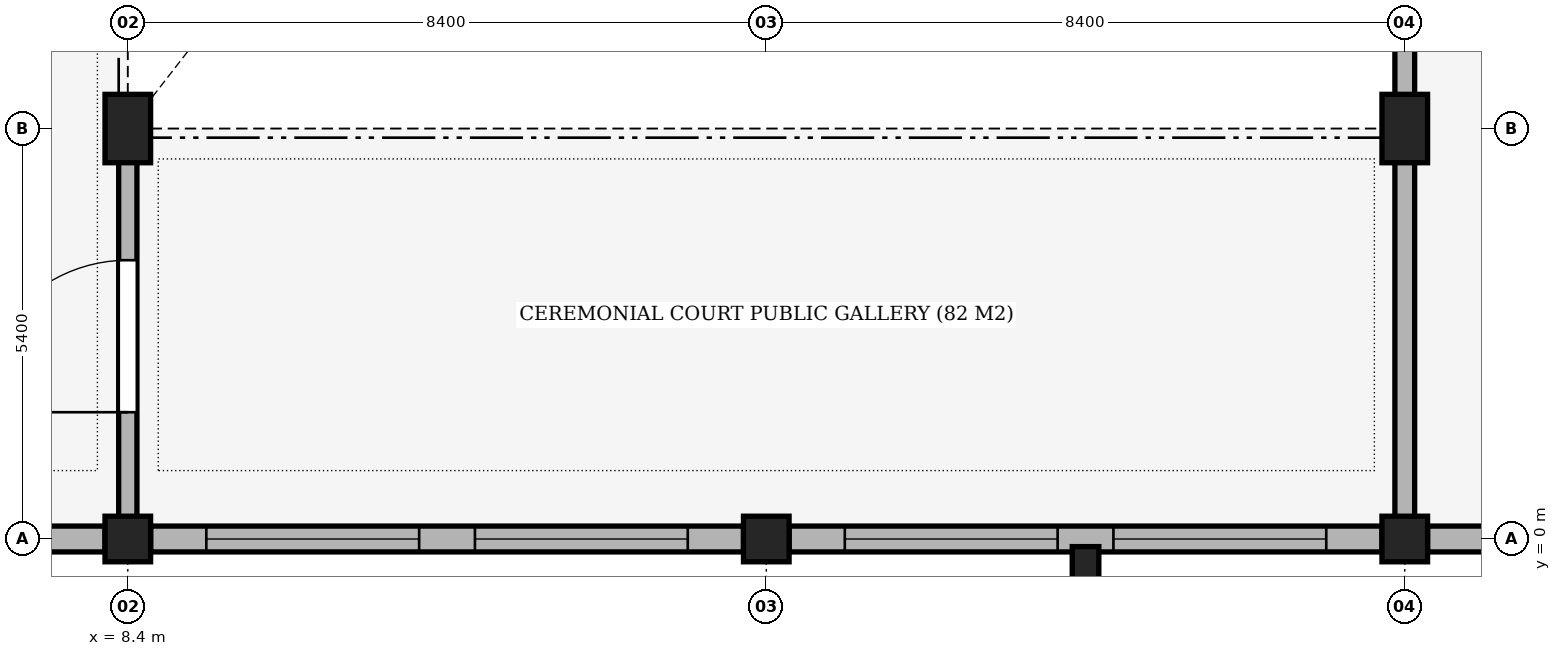
"""IFC4 building model, lengths in metres.
Left out: names, types, materials, properties, quantities, classifications, styles, units other than length and angle.
Written with IfcOpenShell. Run it as: python <this file> out.ifc"""

import sys

from ifc_helpers import new_model, si_unit, direction, frame, frame_2d, origin, origin_2d, place, context, subcontext, project, spatial, rectangle, extrude, element, fill, save


model = new_model("IFC4")
c1 = context("Model", 3, precision=1e-05, world=origin(), true_north=direction((0.0, 1.0)))
c2 = subcontext(c1, "Body", "Model", "MODEL_VIEW")
j1 = project(units=[si_unit("LENGTHUNIT", "METRE"), si_unit("PLANEANGLEUNIT", "RADIAN")], contexts=[c1])
p1 = place(None, origin())
s1 = spatial("IfcSite", under=j1, at=p1, CompositionType="ELEMENT")
p2 = place(p1, origin())
s2 = spatial("IfcBuilding", under=s1, at=p2, CompositionType="ELEMENT")
p3 = place(p2, frame((0.0, 0.0, 15.3)))
s3 = spatial("IfcBuildingStorey", under=s2, at=p3, CompositionType="ELEMENT", Elevation=15.3)
p4 = place(p3, frame((8.4, 0.0, 0.0), z_axis=(0.0, 0.0, 1.0), x_axis=(1.0, 0.0, 0.0)))
e1 = element("IfcColumn", 1, at=p4, inside=s3, PredefinedType="COLUMN", context=c2, shape_type="SweptSolid", body=[
    extrude(rectangle(XDim=0.6, YDim=0.6, at=origin_2d()), origin(), (0.0, 0.0, 1.0), 5.1),
])
p5 = place(p3, frame((8.4, 5.4, 0.0), z_axis=(0.0, 0.0, 1.0), x_axis=(1.0, 0.0, 0.0)))
e2 = element("IfcColumn", 2, at=p5, inside=s3, PredefinedType="COLUMN", context=c2, shape_type="SweptSolid", body=[
    extrude(rectangle(XDim=0.6, YDim=0.9, at=origin_2d()), origin(), (0.0, 0.0, 1.0), 5.1),
])
for number, where, z_axis, x_axis in (
    (3, (16.8, 0.0, 0.0), (0.0, 0.0, 1.0), (1.0, 0.0, 0.0)),
    (4, (25.2, 0.0, 0.0), (0.0, 0.0, 1.0), (1.0, 0.0, 0.0)),
):
    element("IfcColumn", number, at=place(p3, frame(where, z_axis=z_axis, x_axis=x_axis)), inside=s3, PredefinedType="COLUMN", context=c2, shape_type="SweptSolid", body=[
        extrude(rectangle(XDim=0.6, YDim=0.6, at=origin_2d()), origin(), (0.0, 0.0, 1.0), 5.1),
    ])
p6 = place(p3, frame((25.2, 5.4, 0.0), z_axis=(0.0, 0.0, 1.0), x_axis=(1.0, 0.0, 0.0)))
e5 = element("IfcColumn", 5, at=p6, inside=s3, PredefinedType="COLUMN", context=c2, shape_type="SweptSolid", body=[
    extrude(rectangle(XDim=0.6, YDim=0.9, at=origin_2d()), origin(), (0.0, 0.0, 1.0), 5.1),
])
p7 = place(p3, frame((21.0, -0.35, 0.0), z_axis=(0.0, 0.0, 1.0), x_axis=(1.0, 0.0, 0.0)))
e6 = element("IfcColumn", 6, at=p7, inside=s3, PredefinedType="PILASTER", context=c2, shape_type="SweptSolid", body=[
    extrude(rectangle(XDim=0.35, YDim=0.5, at=origin_2d()), origin(), (0.0, 0.0, 1.0), 5.1),
])
p8 = place(p3, frame((33.3, 0.0, 0.0), z_axis=(0.0, 0.0, 1.0), x_axis=(-1.0, 0.0, 0.0)))
e7 = element("IfcWall", 7, at=p8, inside=s3, PredefinedType="SOLIDWALL", context=c2, shape_type="SweptSolid", body=[
    extrude(rectangle(XDim=7.8, YDim=0.34, at=frame_2d((3.9, 0.0))), origin(), (0.0, 0.0, 1.0), 4.14),
])
p9 = place(p8, frame((4.267, 0.0, 0.75)))
e8 = element("IfcOpeningElement", 8, at=p9, cuts=e7, PredefinedType="OPENING", context=c2, shape_type="SweptSolid", body=[
    extrude(rectangle(XDim=2.8, YDim=2.6, at=frame_2d((1.4, 1.3))), frame((0.0, 0.185, 0.0), z_axis=(0.0, -1.0, 0.0), x_axis=(1.0, 0.0, 0.0)), (0.0, 0.0, 1.0), 0.37),
])
p10 = place(p3, frame((24.9, 0.0, 0.0), z_axis=(0.0, 0.0, 1.0), x_axis=(-1.0, 0.0, 0.0)))
e9 = element("IfcWall", 9, at=p10, inside=s3, PredefinedType="SOLIDWALL", context=c2, shape_type="SweptSolid", body=[
    extrude(rectangle(XDim=7.8, YDim=0.34, at=frame_2d((3.9, 0.0))), origin(), (0.0, 0.0, 1.0), 4.14),
])
p11 = place(p10, frame((0.733, 0.0, 0.75)))
e10 = element("IfcOpeningElement", 10, at=p11, cuts=e9, PredefinedType="OPENING", context=c2, shape_type="SweptSolid", body=[
    extrude(rectangle(XDim=2.8, YDim=2.6, at=frame_2d((1.4, 1.3))), frame((0.0, 0.185, 0.0), z_axis=(0.0, -1.0, 0.0), x_axis=(1.0, 0.0, 0.0)), (0.0, 0.0, 1.0), 0.37),
])
p12 = place(p10, frame((4.267, 0.0, 0.75)))
e11 = element("IfcOpeningElement", 11, at=p12, cuts=e9, PredefinedType="OPENING", context=c2, shape_type="SweptSolid", body=[
    extrude(rectangle(XDim=2.8, YDim=2.6, at=frame_2d((1.4, 1.3))), frame((0.0, 0.185, 0.0), z_axis=(0.0, -1.0, 0.0), x_axis=(1.0, 0.0, 0.0)), (0.0, 0.0, 1.0), 0.37),
])
p13 = place(p3, frame((16.5, 0.0, 0.0), z_axis=(0.0, 0.0, 1.0), x_axis=(-1.0, 0.0, 0.0)))
e12 = element("IfcWall", 12, at=p13, inside=s3, PredefinedType="SOLIDWALL", context=c2, shape_type="SweptSolid", body=[
    extrude(rectangle(XDim=7.8, YDim=0.34, at=frame_2d((3.9, 0.0))), origin(), (0.0, 0.0, 1.0), 4.14),
])
p14 = place(p13, frame((0.733, 0.0, 0.75)))
e13 = element("IfcOpeningElement", 13, at=p14, cuts=e12, PredefinedType="OPENING", context=c2, shape_type="SweptSolid", body=[
    extrude(rectangle(XDim=2.8, YDim=2.6, at=frame_2d((1.4, 1.3))), frame((0.0, 0.185, 0.0), z_axis=(0.0, -1.0, 0.0), x_axis=(1.0, 0.0, 0.0)), (0.0, 0.0, 1.0), 0.37),
])
p15 = place(p13, frame((4.267, 0.0, 0.75)))
e14 = element("IfcOpeningElement", 14, at=p15, cuts=e12, PredefinedType="OPENING", context=c2, shape_type="SweptSolid", body=[
    extrude(rectangle(XDim=2.8, YDim=2.6, at=frame_2d((1.4, 1.3))), frame((0.0, 0.185, 0.0), z_axis=(0.0, -1.0, 0.0), x_axis=(1.0, 0.0, 0.0)), (0.0, 0.0, 1.0), 0.37),
])
p16 = place(p3, frame((8.1, 0.0, 0.0), z_axis=(0.0, 0.0, 1.0), x_axis=(-1.0, 0.0, 0.0)))
e15 = element("IfcWall", 15, at=p16, inside=s3, PredefinedType="SOLIDWALL", context=c2, shape_type="SweptSolid", body=[
    extrude(rectangle(XDim=7.8, YDim=0.34, at=frame_2d((3.9, 0.0))), origin(), (0.0, 0.0, 1.0), 4.14),
])
p17 = place(p16, frame((0.733, 0.0, 0.75)))
e16 = element("IfcOpeningElement", 16, at=p17, cuts=e15, PredefinedType="OPENING", context=c2, shape_type="SweptSolid", body=[
    extrude(rectangle(XDim=2.8, YDim=2.6, at=frame_2d((1.4, 1.3))), frame((0.0, 0.185, 0.0), z_axis=(0.0, -1.0, 0.0), x_axis=(1.0, 0.0, 0.0)), (0.0, 0.0, 1.0), 0.37),
])
p18 = place(p16, frame((4.267, 0.0, 0.75)))
e17 = element("IfcOpeningElement", 17, at=p18, cuts=e15, PredefinedType="OPENING", context=c2, shape_type="SweptSolid", body=[
    extrude(rectangle(XDim=2.8, YDim=2.6, at=frame_2d((1.4, 1.3))), frame((0.0, 0.185, 0.0), z_axis=(0.0, -1.0, 0.0), x_axis=(1.0, 0.0, 0.0)), (0.0, 0.0, 1.0), 0.37),
])
p19 = place(p3, frame((8.4, -0.064, 0.0), z_axis=(0.0, 0.0, 1.0), x_axis=(0.0, 1.0, 0.0)))
e18 = element("IfcWall", 18, at=p19, inside=s3, PredefinedType="PARTITIONING", context=c2, shape_type="SweptSolid", body=[
    extrude(rectangle(XDim=5.464, YDim=0.24, at=frame_2d((2.732, 0.0))), origin(), (0.0, 0.0, 1.0), 3.69),
])
p20 = place(p19, frame((1.732, 0.0, 0.0)))
e19 = element("IfcOpeningElement", 19, at=p20, cuts=e18, PredefinedType="OPENING", context=c2, shape_type="SweptSolid", body=[
    extrude(rectangle(XDim=2.0, YDim=2.5, at=frame_2d((1.0, 1.25))), frame((0.0, 0.135, 0.0), z_axis=(0.0, -1.0, 0.0), x_axis=(1.0, 0.0, 0.0)), (0.0, 0.0, 1.0), 0.27),
])
p21 = place(p3, frame((25.2, -0.064, 0.0), z_axis=(0.0, 0.0, 1.0), x_axis=(0.0, 1.0, 0.0)))
e20 = element("IfcWall", 20, at=p21, inside=s3, PredefinedType="PARTITIONING", context=c2, shape_type="SweptSolid", body=[
    extrude(rectangle(XDim=5.464, YDim=0.26, at=frame_2d((2.732, 0.0))), origin(), (0.0, 0.0, 1.0), 3.69),
])
p22 = place(p3, frame((25.2, 5.4, 0.0), z_axis=(0.0, 0.0, 1.0), x_axis=(0.0, 1.0, 0.0)))
e21 = element("IfcWall", 21, at=p22, inside=s3, PredefinedType="PARTITIONING", context=c2, shape_type="SweptSolid", body=[
    extrude(rectangle(XDim=21.478, YDim=0.26, at=frame_2d((10.739, 0.0))), origin(), (0.0, 0.0, 1.0), 3.59),
])
p23 = place(p11, origin())
e22 = element("IfcWindow", 22, at=p23, inside=s3, PartitioningType="SINGLE_PANEL", PredefinedType="WINDOW", context=c2, shape_type="SweptSolid", body=[
    extrude(rectangle(XDim=2.8, YDim=2.6, at=frame_2d((1.4, 1.3))), frame((0.0, 0.03, 0.0), z_axis=(0.0, -1.0, 0.0), x_axis=(1.0, 0.0, 0.0)), (0.0, 0.0, 1.0), 0.06),
])
fill(e10, e22)
p24 = place(p12, origin())
e23 = element("IfcWindow", 23, at=p24, inside=s3, PartitioningType="SINGLE_PANEL", PredefinedType="WINDOW", context=c2, shape_type="SweptSolid", body=[
    extrude(rectangle(XDim=2.8, YDim=2.6, at=frame_2d((1.4, 1.3))), frame((0.0, 0.03, 0.0), z_axis=(0.0, -1.0, 0.0), x_axis=(1.0, 0.0, 0.0)), (0.0, 0.0, 1.0), 0.06),
])
fill(e11, e23)
p25 = place(p14, origin())
e24 = element("IfcWindow", 24, at=p25, inside=s3, PartitioningType="SINGLE_PANEL", PredefinedType="WINDOW", context=c2, shape_type="SweptSolid", body=[
    extrude(rectangle(XDim=2.8, YDim=2.6, at=frame_2d((1.4, 1.3))), frame((0.0, 0.03, 0.0), z_axis=(0.0, -1.0, 0.0), x_axis=(1.0, 0.0, 0.0)), (0.0, 0.0, 1.0), 0.06),
])
fill(e13, e24)
p26 = place(p15, origin())
e25 = element("IfcWindow", 25, at=p26, inside=s3, PartitioningType="SINGLE_PANEL", PredefinedType="WINDOW", context=c2, shape_type="SweptSolid", body=[
    extrude(rectangle(XDim=2.8, YDim=2.6, at=frame_2d((1.4, 1.3))), frame((0.0, 0.03, 0.0), z_axis=(0.0, -1.0, 0.0), x_axis=(1.0, 0.0, 0.0)), (0.0, 0.0, 1.0), 0.06),
])
fill(e14, e25)
p27 = place(p20, origin())
e26 = element("IfcDoor", 26, at=p27, inside=s3, OperationType="SINGLE_SWING_LEFT", PredefinedType="DOOR", context=c2, shape_type="SweptSolid", body=[
    extrude(rectangle(XDim=2.0, YDim=2.5, at=frame_2d((1.0, 1.25))), frame((0.0, 0.025, 0.0), z_axis=(0.0, -1.0, 0.0), x_axis=(1.0, 0.0, 0.0)), (0.0, 0.0, 1.0), 0.05),
])
fill(e19, e26)
save(model, sys.argv[1])
